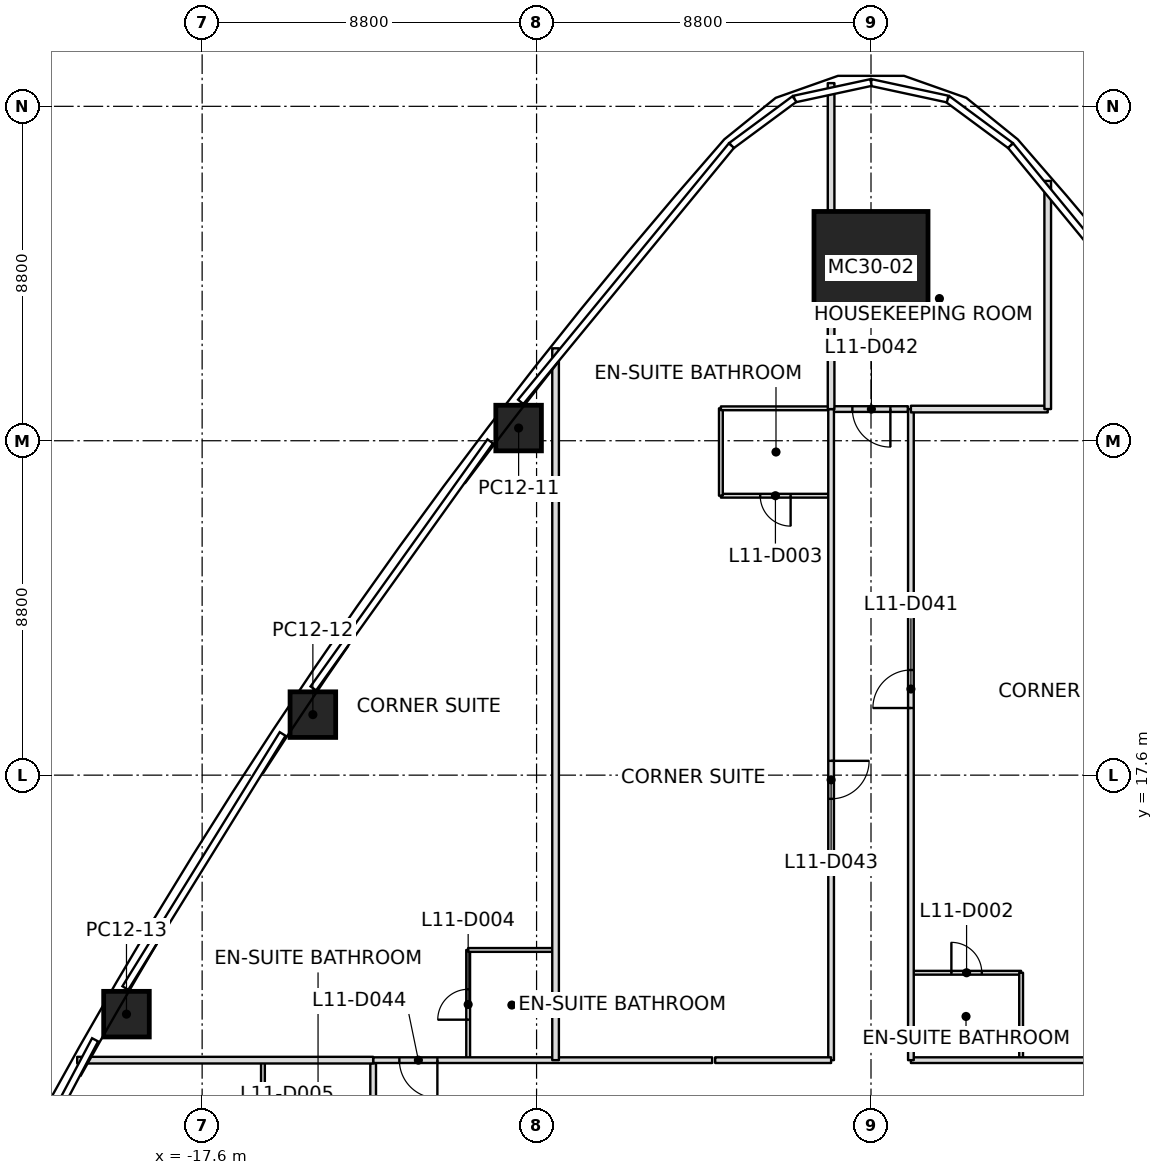
"""IFC4 building model, lengths in metres.
Left out: names, types, materials, properties, quantities, classifications, styles, units other than length and angle.
Written with IfcOpenShell. Run it as: python <this file> out.ifc"""

import sys

from ifc_helpers import new_model, si_unit, direction, frame, frame_2d, origin, origin_2d, place, context, subcontext, project, spatial, rectangle, extrude, element, fill, save


model = new_model("IFC4")
c1 = context("Model", 3, precision=1e-05, world=origin(), true_north=direction((0.0, 1.0)))
c2 = subcontext(c1, "Body", "Model", "MODEL_VIEW")
j1 = project(units=[si_unit("LENGTHUNIT", "METRE"), si_unit("PLANEANGLEUNIT", "RADIAN")], contexts=[c1])
p1 = place(None, origin())
s1 = spatial("IfcSite", under=j1, at=p1, CompositionType="ELEMENT")
p2 = place(p1, origin())
s2 = spatial("IfcBuilding", under=s1, at=p2, CompositionType="ELEMENT")
p3 = place(p2, frame((0.0, 0.0, 62.8)))
s3 = spatial("IfcBuildingStorey", under=s2, at=p3, CompositionType="ELEMENT", Elevation=62.8)
p4 = place(p3, frame((0.0, 30.933, 0.0), z_axis=(0.0, -0.035279904102, 0.999377470412), x_axis=(1.0, 0.0, 0.0)))
e1 = element("IfcColumn", 1, at=p4, inside=s3, PredefinedType="COLUMN", context=c2, shape_type="SweptSolid", body=[
    extrude(rectangle(XDim=3.0, YDim=3.0, at=origin_2d()), origin(), (0.0, 0.0, 1.0), 3.702),
])
p5 = place(p3, frame((-9.272, 26.734, 0.0), z_axis=(0.000263873276, -0.02236326018, 0.999749876202), x_axis=(0.609679031442, 0.792453744126, 0.017565364773)))
e2 = element("IfcColumn", 2, at=p5, inside=s3, PredefinedType="COLUMN", context=c2, shape_type="SweptSolid", body=[
    extrude(rectangle(XDim=1.2, YDim=1.2, at=origin_2d()), origin(), (0.0, 0.0, 1.0), 3.701),
])
p6 = place(p3, frame((-14.686, 19.193, 0.0), z_axis=(0.005674016471, -0.014382971985, 0.999880460682), x_axis=(0.556042983249, 0.831106950726, 0.00879984287)))
e3 = element("IfcColumn", 3, at=p6, inside=s3, PredefinedType="COLUMN", context=c2, shape_type="SweptSolid", body=[
    extrude(rectangle(XDim=1.2, YDim=1.2, at=origin_2d()), origin(), (0.0, 0.0, 1.0), 3.7),
])
p7 = place(p3, frame((-19.591, 11.311, 0.0), z_axis=(0.010754697325, -0.00620209539, 0.999922932279), x_axis=(0.499971083285, 0.866042098195, -5.762411e-06)))
e4 = element("IfcColumn", 4, at=p7, inside=s3, PredefinedType="COLUMN", context=c2, shape_type="SweptSolid", body=[
    extrude(rectangle(XDim=1.2, YDim=1.2, at=origin_2d()), origin(), (0.0, 0.0, 1.0), 3.7),
])
p8 = place(p3, frame((-13.1, 10.1, 0.0), z_axis=(0.0, 0.0, 1.0), x_axis=(-1.0, 0.0, 0.0)))
e5 = element("IfcWall", 5, at=p8, inside=s3, PredefinedType="PARTITIONING", context=c2, shape_type="SweptSolid", body=[
    extrude(rectangle(XDim=7.788, YDim=0.175, at=frame_2d((3.894, 0.0))), origin(), (0.0, 0.0, 1.0), 2.934),
])
p9 = place(p3, frame((-8.3, 10.1, 0.0), z_axis=(0.0, 0.0, 1.0), x_axis=(0.0, 1.0, 0.0)))
e6 = element("IfcWall", 6, at=p9, inside=s3, PredefinedType="PARTITIONING", context=c2, shape_type="SweptSolid", body=[
    extrude(rectangle(XDim=18.732, YDim=0.175, at=frame_2d((9.366, 0.0))), origin(), (0.0, 0.0, 1.0), 2.934),
])
p10 = place(p3, frame((-1.05, 35.811, 0.0), z_axis=(0.0, 0.0, 1.0), x_axis=(0.0, -1.0, 0.0)))
e7 = element("IfcWall", 7, at=p10, inside=s3, PredefinedType="PARTITIONING", context=c2, shape_type="SweptSolid", body=[
    extrude(rectangle(XDim=8.578, YDim=0.175, at=frame_2d((4.289, 0.0))), origin(), (0.0, 0.0, 1.0), 2.934),
])
p11 = place(p3, frame((1.05, 27.233, 0.0), z_axis=(0.0, 0.0, 1.0), x_axis=(1.0, 0.0, 0.0)))
e8 = element("IfcWall", 8, at=p11, inside=s3, PredefinedType="PARTITIONING", context=c2, shape_type="SweptSolid", body=[
    extrude(rectangle(XDim=3.6, YDim=0.175, at=frame_2d((1.8, 0.0))), origin(), (0.0, 0.0, 1.0), 3.15),
])
p12 = place(p3, frame((4.65, 27.233, 0.0), z_axis=(0.0, 0.0, 1.0), x_axis=(0.0, 1.0, 0.0)))
e9 = element("IfcWall", 9, at=p12, inside=s3, PredefinedType="PARTITIONING", context=c2, shape_type="SweptSolid", body=[
    extrude(rectangle(XDim=6.005, YDim=0.175, at=frame_2d((3.002, 0.0))), origin(), (0.0, 0.0, 1.0), 2.934),
])
p13 = place(p3, frame((-13.1, 10.02, 0.0), z_axis=(0.0, 0.0, 1.0), x_axis=(0.0, -1.0, 0.0)))
e10 = element("IfcWall", 10, at=p13, inside=s3, PredefinedType="PARTITIONING", context=c2, shape_type="SweptSolid", body=[
    extrude(rectangle(XDim=16.371, YDim=0.15, at=frame_2d((8.186, 0.0))), origin(), (0.0, 0.0, 1.0), 3.017),
])
p14 = place(p13, frame((2.545, 0.0, 0.0)))
e11 = element("IfcOpeningElement", 11, at=p14, cuts=e10, PredefinedType="OPENING", context=c2, shape_type="SweptSolid", body=[
    extrude(rectangle(XDim=1.0, YDim=2.1, at=frame_2d((0.5, 1.05))), frame((0.0, 0.075, 0.0), z_axis=(0.0, -1.0, 0.0), x_axis=(1.0, 0.0, 0.0)), (0.0, 0.0, 1.0), 0.15),
])
p15 = place(p13, frame((10.771, 0.0, 0.0)))
e12 = element("IfcOpeningElement", 12, at=p15, cuts=e10, PredefinedType="OPENING", context=c2, shape_type="SweptSolid", body=[
    extrude(rectangle(XDim=1.0, YDim=2.1, at=frame_2d((0.5, 1.05))), frame((0.0, 0.075, 0.0), z_axis=(0.0, -1.0, 0.0), x_axis=(1.0, 0.0, 0.0)), (0.0, 0.0, 1.0), 0.15),
])
p16 = place(p3, frame((-4.18, 10.1, 0.0), z_axis=(0.0, 0.0, 1.0), x_axis=(-1.0, 0.0, 0.0)))
e13 = element("IfcWall", 13, at=p16, inside=s3, PredefinedType="PARTITIONING", context=c2, shape_type="SweptSolid", body=[
    extrude(rectangle(XDim=8.92, YDim=0.15, at=frame_2d((4.46, 0.0))), origin(), (0.0, 0.0, 1.0), 2.947),
])
p17 = place(p16, frame((7.23, 0.0, 0.0)))
e14 = element("IfcOpeningElement", 14, at=p17, cuts=e13, PredefinedType="OPENING", context=c2, shape_type="SweptSolid", body=[
    extrude(rectangle(XDim=1.0, YDim=2.1, at=frame_2d((0.5, 1.05))), frame((0.0, 0.075, 0.0), z_axis=(0.0, -1.0, 0.0), x_axis=(1.0, 0.0, 0.0)), (0.0, 0.0, 1.0), 0.15),
])
p18 = place(p3, frame((0.97, 27.233, 0.0), z_axis=(0.0, 0.0, 1.0), x_axis=(-1.0, 0.0, 0.0)))
e15 = element("IfcWall", 15, at=p18, inside=s3, PredefinedType="PARTITIONING", context=c2, shape_type="SweptSolid", body=[
    extrude(rectangle(XDim=2.02, YDim=0.15, at=frame_2d((1.01, 0.0))), origin(), (0.0, 0.0, 1.0), 2.797),
])
p19 = place(p18, frame((0.46, 0.0, 0.0)))
e16 = element("IfcOpeningElement", 16, at=p19, cuts=e15, PredefinedType="OPENING", context=c2, shape_type="SweptSolid", body=[
    extrude(rectangle(XDim=1.0, YDim=2.1, at=frame_2d((0.5, 1.05))), frame((0.0, 0.075, 0.0), z_axis=(0.0, -1.0, 0.0), x_axis=(1.0, 0.0, 0.0)), (0.0, 0.0, 1.0), 0.15),
])
p20 = place(p3, frame((-1.05, 27.233, 0.0), z_axis=(0.0, 0.0, 1.0), x_axis=(0.0, -1.0, 0.0)))
e17 = element("IfcWall", 17, at=p20, inside=s3, PredefinedType="PARTITIONING", context=c2, shape_type="SweptSolid", body=[
    extrude(rectangle(XDim=17.133, YDim=0.15, at=frame_2d((8.566, 0.0))), origin(), (0.0, 0.0, 1.0), 2.947),
])
p21 = place(p20, frame((9.257, 0.0, 0.0)))
e18 = element("IfcOpeningElement", 18, at=p21, cuts=e17, PredefinedType="OPENING", context=c2, shape_type="SweptSolid", body=[
    extrude(rectangle(XDim=1.0, YDim=2.1, at=frame_2d((0.5, 1.05))), frame((0.0, 0.075, 0.0), z_axis=(0.0, -1.0, 0.0), x_axis=(1.0, 0.0, 0.0)), (0.0, 0.0, 1.0), 0.15),
])
p22 = place(p3, frame((-1.05, 10.1, 0.0), z_axis=(0.0, 0.0, 1.0), x_axis=(-1.0, 0.0, 0.0)))
e19 = element("IfcWall", 19, at=p22, inside=s3, PredefinedType="PARTITIONING", context=c2, shape_type="SweptSolid", body=[
    extrude(rectangle(XDim=3.05, YDim=0.15, at=frame_2d((1.525, 0.0))), origin(), (0.0, 0.0, 1.0), 3.15),
])
p23 = place(p3, frame((13.02, 10.1, 0.0), z_axis=(0.0, 0.0, 1.0), x_axis=(-1.0, 0.0, 0.0)))
e20 = element("IfcWall", 20, at=p23, inside=s3, PredefinedType="PARTITIONING", context=c2, shape_type="SweptSolid", body=[
    extrude(rectangle(XDim=11.97, YDim=0.15, at=frame_2d((5.985, 0.0))), origin(), (0.0, 0.0, 1.0), 2.947),
])
p24 = place(p23, frame((1.235, 0.0, 0.0)))
e21 = element("IfcOpeningElement", 21, at=p24, cuts=e20, PredefinedType="OPENING", context=c2, shape_type="SweptSolid", body=[
    extrude(rectangle(XDim=1.0, YDim=2.1, at=frame_2d((0.5, 1.05))), frame((0.0, 0.075, 0.0), z_axis=(0.0, -1.0, 0.0), x_axis=(1.0, 0.0, 0.0)), (0.0, 0.0, 1.0), 0.15),
])
p25 = place(p3, frame((1.05, 10.1, 0.0), z_axis=(0.0, 0.0, 1.0), x_axis=(0.0, 1.0, 0.0)))
e22 = element("IfcWall", 22, at=p25, inside=s3, PredefinedType="PARTITIONING", context=c2, shape_type="SweptSolid", body=[
    extrude(rectangle(XDim=17.133, YDim=0.15, at=frame_2d((8.566, 0.0))), origin(), (0.0, 0.0, 1.0), 2.947),
])
p26 = place(p25, frame((9.267, 0.0, 0.0)))
e23 = element("IfcOpeningElement", 23, at=p26, cuts=e22, PredefinedType="OPENING", context=c2, shape_type="SweptSolid", body=[
    extrude(rectangle(XDim=1.0, YDim=2.1, at=frame_2d((0.5, 1.05))), frame((0.0, 0.075, 0.0), z_axis=(0.0, -1.0, 0.0), x_axis=(1.0, 0.0, 0.0)), (0.0, 0.0, 1.0), 0.15),
])
p27 = place(p3, frame((-16.0, 7.8, 0.0), z_axis=(0.0, 0.0, 1.0), x_axis=(0.0, 1.0, 0.0)))
e24 = element("IfcWall", 24, at=p27, inside=s3, PredefinedType="PARTITIONING", context=c2, shape_type="SweptSolid", body=[
    extrude(rectangle(XDim=2.27, YDim=0.1, at=frame_2d((1.135, 0.0))), origin(), (0.0, 0.0, 1.0), 3.15),
])
p28 = place(p3, frame((-10.6, 10.13, 0.0), z_axis=(0.0, 0.0, 1.0), x_axis=(0.0, 1.0, 0.0)))
e25 = element("IfcWall", 25, at=p28, inside=s3, PredefinedType="PARTITIONING", context=c2, shape_type="SweptSolid", body=[
    extrude(rectangle(XDim=2.87, YDim=0.1, at=frame_2d((1.435, 0.0))), origin(), (0.0, 0.0, 1.0), 3.15),
])
p29 = place(p28, frame((1.035, 0.0, 0.0)))
e26 = element("IfcOpeningElement", 26, at=p29, cuts=e25, PredefinedType="OPENING", context=c2, shape_type="SweptSolid", body=[
    extrude(rectangle(XDim=0.8, YDim=2.1, at=frame_2d((0.4, 1.05))), frame((0.0, 0.05, 0.0), z_axis=(0.0, -1.0, 0.0), x_axis=(1.0, 0.0, 0.0)), (0.0, 0.0, 1.0), 0.1),
])
p30 = place(p3, frame((-10.6, 13.0, 0.0), z_axis=(0.0, 0.0, 1.0), x_axis=(1.0, 0.0, 0.0)))
e27 = element("IfcWall", 27, at=p30, inside=s3, PredefinedType="PARTITIONING", context=c2, shape_type="SweptSolid", body=[
    extrude(rectangle(XDim=2.27, YDim=0.1, at=frame_2d((1.135, 0.0))), origin(), (0.0, 0.0, 1.0), 2.947),
])
p31 = place(p3, frame((-1.08, 24.953, 0.0), z_axis=(0.0, 0.0, 1.0), x_axis=(-1.0, 0.0, 0.0)))
e28 = element("IfcWall", 28, at=p31, inside=s3, PredefinedType="PARTITIONING", context=c2, shape_type="SweptSolid", body=[
    extrude(rectangle(XDim=2.87, YDim=0.1, at=frame_2d((1.435, 0.0))), origin(), (0.0, 0.0, 1.0), 3.15),
])
p32 = place(p31, frame((1.035, 0.0, 0.0)))
e29 = element("IfcOpeningElement", 29, at=p32, cuts=e28, PredefinedType="OPENING", context=c2, shape_type="SweptSolid", body=[
    extrude(rectangle(XDim=0.8, YDim=2.1, at=frame_2d((0.4, 1.05))), frame((0.0, 0.05, 0.0), z_axis=(0.0, -1.0, 0.0), x_axis=(1.0, 0.0, 0.0)), (0.0, 0.0, 1.0), 0.1),
])
p33 = place(p3, frame((-3.95, 24.953, 0.0), z_axis=(0.0, 0.0, 1.0), x_axis=(0.0, 1.0, 0.0)))
e30 = element("IfcWall", 30, at=p33, inside=s3, PredefinedType="PARTITIONING", context=c2, shape_type="SweptSolid", body=[
    extrude(rectangle(XDim=2.3, YDim=0.1, at=frame_2d((1.15, 0.0))), origin(), (0.0, 0.0, 1.0), 3.15),
])
p34 = place(p3, frame((-3.95, 27.253, 0.0), z_axis=(0.0, 0.0, 1.0), x_axis=(1.0, 0.0, 0.0)))
e31 = element("IfcWall", 31, at=p34, inside=s3, PredefinedType="PARTITIONING", context=c2, shape_type="SweptSolid", body=[
    extrude(rectangle(XDim=2.87, YDim=0.1, at=frame_2d((1.435, 0.0))), origin(), (0.0, 0.0, 1.0), 3.15),
])
p35 = place(p3, frame((1.08, 12.4, 0.0), z_axis=(0.0, 0.0, 1.0), x_axis=(1.0, 0.0, 0.0)))
e32 = element("IfcWall", 32, at=p35, inside=s3, PredefinedType="PARTITIONING", context=c2, shape_type="SweptSolid", body=[
    extrude(rectangle(XDim=2.87, YDim=0.1, at=frame_2d((1.435, 0.0))), origin(), (0.0, 0.0, 1.0), 3.15),
])
p36 = place(p35, frame((1.035, 0.0, 0.0)))
e33 = element("IfcOpeningElement", 33, at=p36, cuts=e32, PredefinedType="OPENING", context=c2, shape_type="SweptSolid", body=[
    extrude(rectangle(XDim=0.8, YDim=2.1, at=frame_2d((0.4, 1.05))), frame((0.0, 0.05, 0.0), z_axis=(0.0, -1.0, 0.0), x_axis=(1.0, 0.0, 0.0)), (0.0, 0.0, 1.0), 0.1),
])
p37 = place(p3, frame((3.95, 12.4, 0.0), z_axis=(0.0, 0.0, 1.0), x_axis=(0.0, -1.0, 0.0)))
e34 = element("IfcWall", 34, at=p37, inside=s3, PredefinedType="PARTITIONING", context=c2, shape_type="SweptSolid", body=[
    extrude(rectangle(XDim=2.27, YDim=0.1, at=frame_2d((1.135, 0.0))), origin(), (0.0, 0.0, 1.0), 3.15),
])
p38 = place(p26, origin())
e35 = element("IfcDoor", 35, at=p38, inside=s3, OperationType="SINGLE_SWING_RIGHT", PredefinedType="DOOR", context=c2, shape_type="SweptSolid", body=[
    extrude(rectangle(XDim=1.0, YDim=2.1, at=frame_2d((0.5, 1.05))), frame((0.0, 0.025, 0.0), z_axis=(0.0, -1.0, 0.0), x_axis=(1.0, 0.0, 0.0)), (0.0, 0.0, 1.0), 0.05),
])
fill(e23, e35)
p39 = place(p36, origin())
e36 = element("IfcDoor", 36, at=p39, inside=s3, OperationType="SINGLE_SWING_LEFT", PredefinedType="DOOR", context=c2, shape_type="SweptSolid", body=[
    extrude(rectangle(XDim=0.8, YDim=2.1, at=frame_2d((0.4, 1.05))), frame((0.0, 0.025, 0.0), z_axis=(0.0, -1.0, 0.0), x_axis=(1.0, 0.0, 0.0)), (0.0, 0.0, 1.0), 0.05),
])
fill(e33, e36)
p40 = place(p19, origin())
e37 = element("IfcDoor", 37, at=p40, inside=s3, OperationType="SINGLE_SWING_LEFT", PredefinedType="DOOR", context=c2, shape_type="SweptSolid", body=[
    extrude(rectangle(XDim=1.0, YDim=2.1, at=frame_2d((0.5, 1.05))), frame((0.0, 0.025, 0.0), z_axis=(0.0, -1.0, 0.0), x_axis=(1.0, 0.0, 0.0)), (0.0, 0.0, 1.0), 0.05),
])
fill(e16, e37)
p41 = place(p21, origin())
e38 = element("IfcDoor", 38, at=p41, inside=s3, OperationType="SINGLE_SWING_LEFT", PredefinedType="DOOR", context=c2, shape_type="SweptSolid", body=[
    extrude(rectangle(XDim=1.0, YDim=2.1, at=frame_2d((0.5, 1.05))), frame((0.0, 0.025, 0.0), z_axis=(0.0, -1.0, 0.0), x_axis=(1.0, 0.0, 0.0)), (0.0, 0.0, 1.0), 0.05),
])
fill(e18, e38)
p42 = place(p32, origin())
e39 = element("IfcDoor", 39, at=p42, inside=s3, OperationType="SINGLE_SWING_LEFT", PredefinedType="DOOR", context=c2, shape_type="SweptSolid", body=[
    extrude(rectangle(XDim=0.8, YDim=2.1, at=frame_2d((0.4, 1.05))), frame((0.0, 0.025, 0.0), z_axis=(0.0, -1.0, 0.0), x_axis=(1.0, 0.0, 0.0)), (0.0, 0.0, 1.0), 0.05),
])
fill(e29, e39)
p43 = place(p17, origin())
e40 = element("IfcDoor", 40, at=p43, inside=s3, OperationType="SINGLE_SWING_RIGHT", PredefinedType="DOOR", context=c2, shape_type="SweptSolid", body=[
    extrude(rectangle(XDim=1.0, YDim=2.1, at=frame_2d((0.5, 1.05))), frame((0.0, 0.025, 0.0), z_axis=(0.0, -1.0, 0.0), x_axis=(1.0, 0.0, 0.0)), (0.0, 0.0, 1.0), 0.05),
])
fill(e14, e40)
p44 = place(p29, origin())
e41 = element("IfcDoor", 41, at=p44, inside=s3, OperationType="SINGLE_SWING_LEFT", PredefinedType="DOOR", context=c2, shape_type="SweptSolid", body=[
    extrude(rectangle(XDim=0.8, YDim=2.1, at=frame_2d((0.4, 1.05))), frame((0.0, 0.025, 0.0), z_axis=(0.0, -1.0, 0.0), x_axis=(1.0, 0.0, 0.0)), (0.0, 0.0, 1.0), 0.05),
])
fill(e26, e41)
save(model, sys.argv[1])
